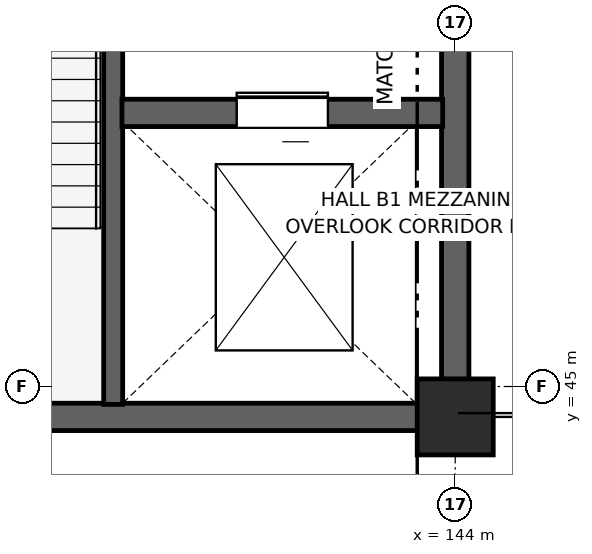
"""IFC4 building model, lengths in metres.
Left out: names, types, materials, properties, quantities, classifications, styles, units other than length and angle.
Written with IfcOpenShell. Run it as: python <this file> out.ifc"""

import sys

from ifc_helpers import new_model, si_unit, direction, frame, frame_2d, origin, origin_2d, place, context, subcontext, project, spatial, rectangle, extrude, element, fill, save


model = new_model("IFC4")
c1 = context("Model", 3, precision=1e-05, world=origin(), true_north=direction((0.0, 1.0)))
c2 = subcontext(c1, "Body", "Model", "MODEL_VIEW")
j1 = project(units=[si_unit("LENGTHUNIT", "METRE"), si_unit("PLANEANGLEUNIT", "RADIAN")], contexts=[c1])
p1 = place(None, origin())
s1 = spatial("IfcSite", under=j1, at=p1, CompositionType="ELEMENT")
p2 = place(p1, origin())
s2 = spatial("IfcBuilding", under=s1, at=p2, CompositionType="ELEMENT")
p3 = place(p2, frame((0.0, 0.0, 6.0)))
s3 = spatial("IfcBuildingStorey", under=s2, at=p3, CompositionType="ELEMENT", Elevation=6.0)
p4 = place(p3, frame((144.0, 44.6, 0.0), z_axis=(0.0, 0.0, 1.0), x_axis=(1.0, 0.0, 0.0)))
e1 = element("IfcColumn", 1, at=p4, inside=s3, PredefinedType="COLUMN", context=c2, shape_type="SweptSolid", body=[
    extrude(rectangle(XDim=1.0, YDim=1.0, at=origin_2d()), origin(), (0.0, 0.0, 1.0), 6.0),
])
p5 = place(p3, frame((144.0, 45.095, 0.0), z_axis=(0.0, 0.0, 1.0), x_axis=(0.0, 1.0, 0.0)))
e2 = element("IfcWall", 2, at=p5, inside=s3, PredefinedType="SHEAR", context=c2, shape_type="SweptSolid", body=[
    extrude(rectangle(XDim=8.01, YDim=0.36, at=frame_2d((4.005, 0.0))), origin(), (0.0, 0.0, 1.0), 5.7),
])
p6 = place(p5, frame((5.305, 0.0, 0.0)))
e3 = element("IfcOpeningElement", 3, at=p6, cuts=e2, PredefinedType="OPENING", context=c2, shape_type="SweptSolid", body=[
    extrude(rectangle(XDim=1.8, YDim=2.3, at=frame_2d((0.9, 1.15))), frame((0.0, 0.19, 0.0), z_axis=(0.0, -1.0, 0.0), x_axis=(1.0, 0.0, 0.0)), (0.0, 0.0, 1.0), 0.38),
])
p7 = place(p3, frame((135.345, 44.6, 0.0), z_axis=(0.0, 0.0, 1.0), x_axis=(1.0, 0.0, 0.0)))
e4 = element("IfcWall", 4, at=p7, inside=s3, PredefinedType="SHEAR", context=c2, shape_type="SweptSolid", body=[
    extrude(rectangle(XDim=8.16, YDim=0.36, at=frame_2d((4.08, 0.0))), origin(), (0.0, 0.0, 1.0), 5.7),
])
p8 = place(p3, frame((139.5, 44.765, 0.0), z_axis=(0.0, 0.0, 1.0), x_axis=(0.0, 1.0, 0.0)))
e5 = element("IfcWall", 5, at=p8, inside=s3, PredefinedType="SHEAR", context=c2, shape_type="SweptSolid", body=[
    extrude(rectangle(XDim=8.67, YDim=0.25, at=frame_2d((4.335, 0.0))), origin(), (0.0, 0.0, 1.0), 5.7),
])
p9 = place(p8, frame((7.32, 0.0, 0.0)))
e6 = element("IfcOpeningElement", 6, at=p9, cuts=e5, PredefinedType="OPENING", context=c2, shape_type="SweptSolid", body=[
    extrude(rectangle(XDim=1.1, YDim=2.2, at=frame_2d((0.55, 1.1))), frame((0.0, 0.135, 0.0), z_axis=(0.0, -1.0, 0.0), x_axis=(1.0, 0.0, 0.0)), (0.0, 0.0, 1.0), 0.27),
])
p10 = place(p3, frame((139.615, 48.6, 0.0), z_axis=(0.0, 0.0, 1.0), x_axis=(1.0, 0.0, 0.0)))
e7 = element("IfcWall", 7, at=p10, inside=s3, PredefinedType="SHEAR", context=c2, shape_type="SweptSolid", body=[
    extrude(rectangle(XDim=4.22, YDim=0.36, at=frame_2d((2.11, 0.0))), origin(), (0.0, 0.0, 1.0), 5.7),
])
p11 = place(p10, frame((1.51, 0.0, 0.0)))
e8 = element("IfcOpeningElement", 8, at=p11, cuts=e7, PredefinedType="OPENING", context=c2, shape_type="SweptSolid", body=[
    extrude(rectangle(XDim=1.2, YDim=2.3, at=frame_2d((0.6, 1.15))), frame((0.0, 0.19, 0.0), z_axis=(0.0, -1.0, 0.0), x_axis=(1.0, 0.0, 0.0)), (0.0, 0.0, 1.0), 0.38),
])
p12 = place(p11, origin())
e9 = element("IfcDoor", 9, at=p12, inside=s3, OperationType="SLIDING_TO_RIGHT", PredefinedType="DOOR", context=c2, shape_type="SweptSolid", body=[
    extrude(rectangle(XDim=1.2, YDim=2.3, at=frame_2d((0.6, 1.15))), frame((0.0, 0.025, 0.0), z_axis=(0.0, -1.0, 0.0), x_axis=(1.0, 0.0, 0.0)), (0.0, 0.0, 1.0), 0.05),
])
fill(e8, e9)
save(model, sys.argv[1])
